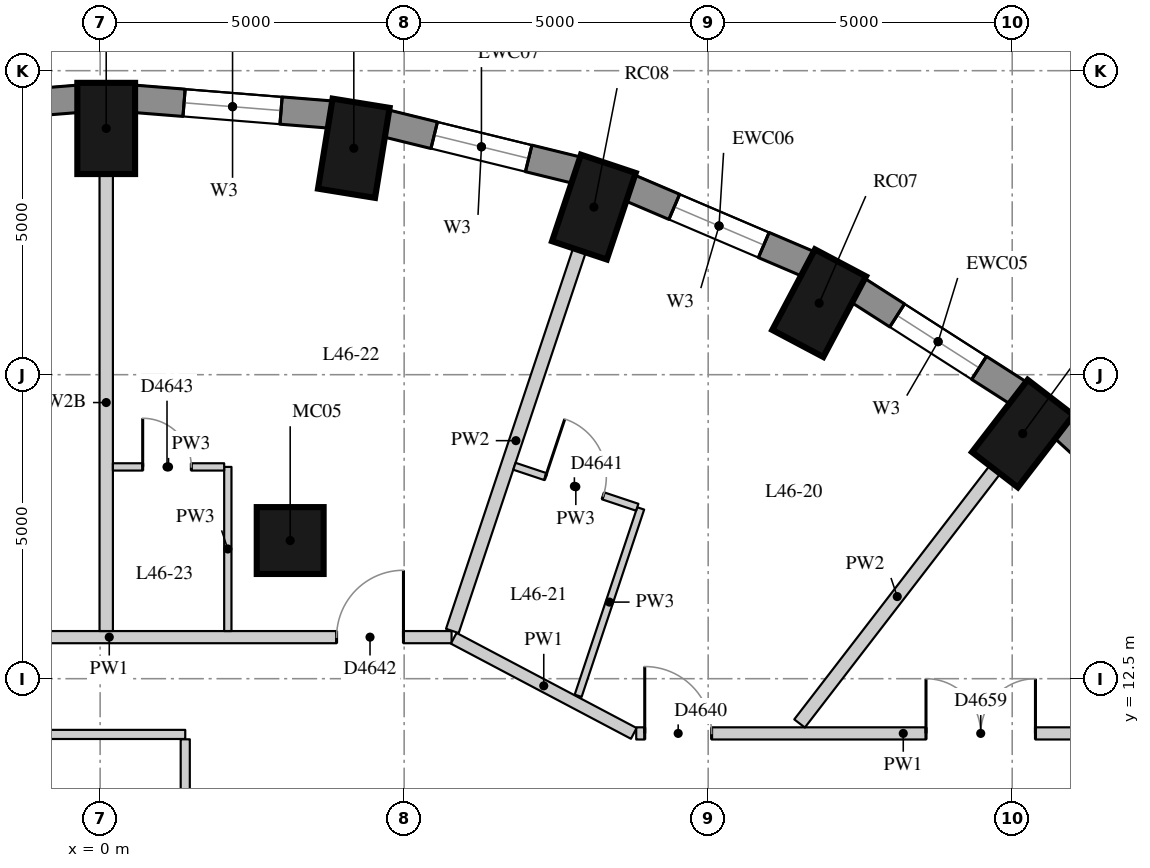
"""IFC4 building model, lengths in metres.
Left out: names, types, materials, properties, quantities, classifications, styles, units other than length and angle.
Written with IfcOpenShell. Run it as: python <this file> out.ifc"""

import sys

from ifc_helpers import new_model, si_unit, direction, frame, frame_2d, origin, origin_2d, place, context, subcontext, project, spatial, rectangle, extrude, element, fill, save


model = new_model("IFC4")
c1 = context("Model", 3, precision=1e-05, world=origin(), true_north=direction((0.0, 1.0)))
c2 = subcontext(c1, "Body", "Model", "MODEL_VIEW")
j1 = project(units=[si_unit("LENGTHUNIT", "METRE"), si_unit("PLANEANGLEUNIT", "RADIAN")], contexts=[c1])
p1 = place(None, origin())
s1 = spatial("IfcSite", under=j1, at=p1, CompositionType="ELEMENT")
p2 = place(p1, origin())
s2 = spatial("IfcBuilding", under=s1, at=p2, CompositionType="ELEMENT")
p3 = place(p2, frame((0.0, 0.0, 164.9)))
s3 = spatial("IfcBuildingStorey", under=s2, at=p3, CompositionType="ELEMENT", Elevation=164.9)
for number, where, z_axis, x_axis in (
    (1, (15.173, 16.532, 0.0), (0.0, 0.0, 1.0), (0.61, 0.792, 0.0)),
    (2, (11.825, 18.676, 0.0), (0.0, 0.0, 1.0), (0.468, 0.884, 0.0)),
    (3, (8.12, 20.256, 0.0), (0.0, 0.0, 1.0), (0.317, 0.949, 0.0)),
    (4, (4.172, 21.224, 0.0), (0.0, 0.0, 1.0), (0.16, 0.987, 0.0)),
    (5, (0.1, 21.55, 0.0), (0.0, 0.0, 1.0), (0.0, 1.0, 0.0)),
):
    element("IfcColumn", number, at=place(p3, frame(where, z_axis=z_axis, x_axis=x_axis)), inside=s3, PredefinedType="COLUMN", context=c2, shape_type="SweptSolid", body=[
        extrude(rectangle(XDim=1.5, YDim=0.95, at=origin_2d()), origin(), (0.0, 0.0, 1.0), 3.3),
    ])
p4 = place(p3, frame((3.126, 14.772, 0.0), z_axis=(0.0, 0.0, 1.0), x_axis=(1.0, 0.0, 0.0)))
e6 = element("IfcColumn", 6, at=p4, inside=s3, PredefinedType="COLUMN", context=c2, shape_type="SweptSolid", body=[
    extrude(rectangle(XDim=1.1, YDim=1.1, at=origin_2d()), origin(), (0.0, 0.0, 1.0), 3.3),
])
p5 = place(p3, frame((18.113, 14.55, 0.0), z_axis=(0.0, 0.0, 1.0), x_axis=(-0.737808755941, 0.675009807082, 0.0)))
e7 = element("IfcWall", 7, at=p5, inside=s3, PredefinedType="SOLIDWALL", context=c2, shape_type="SweptSolid", body=[
    extrude(rectangle(XDim=3.094, YDim=0.45, at=frame_2d((1.547, 0.0))), origin(), (0.0, 0.0, 1.0), 3.02),
])
p6 = place(p3, frame((15.108, 17.193, 0.0), z_axis=(0.0, 0.0, 1.0), x_axis=(-0.842030726237, 0.539429565442, 0.0)))
e8 = element("IfcWall", 8, at=p6, inside=s3, PredefinedType="SOLIDWALL", context=c2, shape_type="SweptSolid", body=[
    extrude(rectangle(XDim=3.151, YDim=0.45, at=frame_2d((1.576, 0.0))), origin(), (0.0, 0.0, 1.0), 3.02),
])
p7 = place(p6, frame((0.776, 0.0, 0.4)))
e9 = element("IfcOpeningElement", 9, at=p7, cuts=e8, PredefinedType="OPENING", context=c2, shape_type="SweptSolid", body=[
    extrude(rectangle(XDim=1.6, YDim=1.75, at=frame_2d((0.8, 0.875))), frame((0.0, 0.235, 0.0), z_axis=(0.0, -1.0, 0.0), x_axis=(1.0, 0.0, 0.0)), (0.0, 0.0, 1.0), 0.47),
])
p8 = place(p3, frame((11.65, 19.319, 0.0), z_axis=(0.0, 0.0, 1.0), x_axis=(-0.91981046949, 0.392362969986, 0.0)))
e10 = element("IfcWall", 10, at=p8, inside=s3, PredefinedType="SOLIDWALL", context=c2, shape_type="SweptSolid", body=[
    extrude(rectangle(XDim=3.201, YDim=0.45, at=frame_2d((1.6, 0.0))), origin(), (0.0, 0.0, 1.0), 3.02),
])
p9 = place(p8, frame((0.8, 0.0, 0.4)))
e11 = element("IfcOpeningElement", 11, at=p9, cuts=e10, PredefinedType="OPENING", context=c2, shape_type="SweptSolid", body=[
    extrude(rectangle(XDim=1.6, YDim=1.75, at=frame_2d((0.8, 0.875))), frame((0.0, 0.235, 0.0), z_axis=(0.0, -1.0, 0.0), x_axis=(1.0, 0.0, 0.0)), (0.0, 0.0, 1.0), 0.47),
])
p10 = place(p3, frame((7.843, 20.862, 0.0), z_axis=(0.0, 0.0, 1.0), x_axis=(-0.971237178372, 0.238114139328, 0.0)))
e12 = element("IfcWall", 12, at=p10, inside=s3, PredefinedType="SOLIDWALL", context=c2, shape_type="SweptSolid", body=[
    extrude(rectangle(XDim=3.237, YDim=0.45, at=frame_2d((1.618, 0.0))), origin(), (0.0, 0.0, 1.0), 3.02),
])
p11 = place(p10, frame((0.818, 0.0, 0.4)))
e13 = element("IfcOpeningElement", 13, at=p11, cuts=e12, PredefinedType="OPENING", context=c2, shape_type="SweptSolid", body=[
    extrude(rectangle(XDim=1.6, YDim=1.75, at=frame_2d((0.8, 0.875))), frame((0.0, 0.235, 0.0), z_axis=(0.0, -1.0, 0.0), x_axis=(1.0, 0.0, 0.0)), (0.0, 0.0, 1.0), 0.47),
])
p12 = place(p3, frame((3.801, 21.778, 0.0), z_axis=(0.0, 0.0, 1.0), x_axis=(-0.996812416891, 0.079780984773, 0.0)))
e14 = element("IfcWall", 14, at=p12, inside=s3, PredefinedType="SOLIDWALL", context=c2, shape_type="SweptSolid", body=[
    extrude(rectangle(XDim=3.256, YDim=0.45, at=frame_2d((1.628, 0.0))), origin(), (0.0, 0.0, 1.0), 3.02),
])
p13 = place(p12, frame((0.828, 0.0, 0.4)))
e15 = element("IfcOpeningElement", 15, at=p13, cuts=e14, PredefinedType="OPENING", context=c2, shape_type="SweptSolid", body=[
    extrude(rectangle(XDim=1.6, YDim=1.75, at=frame_2d((0.8, 0.875))), frame((0.0, 0.235, 0.0), z_axis=(0.0, -1.0, 0.0), x_axis=(1.0, 0.0, 0.0)), (0.0, 0.0, 1.0), 0.47),
])
p14 = place(p3, frame((-0.355, 22.038, 0.0), z_axis=(0.0, 0.0, 1.0), x_axis=(-0.996812416891, -0.079780984773, 0.0)))
e16 = element("IfcWall", 16, at=p14, inside=s3, PredefinedType="SOLIDWALL", context=c2, shape_type="SweptSolid", body=[
    extrude(rectangle(XDim=3.256, YDim=0.45, at=frame_2d((1.628, 0.0))), origin(), (0.0, 0.0, 1.0), 3.02),
])
p15 = place(p14, frame((0.828, 0.0, 0.4)))
e17 = element("IfcOpeningElement", 17, at=p15, cuts=e16, PredefinedType="OPENING", context=c2, shape_type="SweptSolid", body=[
    extrude(rectangle(XDim=1.6, YDim=1.75, at=frame_2d((0.8, 0.875))), frame((0.0, 0.235, 0.0), z_axis=(0.0, -1.0, 0.0), x_axis=(1.0, 0.0, 0.0)), (0.0, 0.0, 1.0), 0.47),
])
p16 = place(p3, frame((-5.48, 13.183, 0.0), z_axis=(0.0, 0.0, 1.0), x_axis=(1.0, 0.0, 0.0)))
e18 = element("IfcWall", 18, at=p16, inside=s3, PredefinedType="PARTITIONING", context=c2, shape_type="SweptSolid", body=[
    extrude(rectangle(XDim=11.26, YDim=0.2, at=frame_2d((5.63, 0.0))), origin(), (0.0, 0.0, 1.0), 3.02),
])
p17 = place(p16, frame((9.368, 0.0, 0.0)))
e19 = element("IfcOpeningElement", 19, at=p17, cuts=e18, PredefinedType="OPENING", context=c2, shape_type="SweptSolid", body=[
    extrude(rectangle(XDim=1.1, YDim=2.1, at=frame_2d((0.55, 1.05))), frame((0.0, 0.11, 0.0), z_axis=(0.0, -1.0, 0.0), x_axis=(1.0, 0.0, 0.0)), (0.0, 0.0, 1.0), 0.22),
])
p18 = place(p16, frame((3.115, 0.0, 0.0)))
e20 = element("IfcOpeningElement", 20, at=p18, cuts=e18, PredefinedType="OPENING", context=c2, shape_type="SweptSolid", body=[
    extrude(rectangle(XDim=1.1, YDim=2.1, at=frame_2d((0.55, 1.05))), frame((0.0, 0.11, 0.0), z_axis=(0.0, -1.0, 0.0), x_axis=(1.0, 0.0, 0.0)), (0.0, 0.0, 1.0), 0.22),
])
p19 = place(p3, frame((5.815, 13.165, 0.0), z_axis=(0.0, 0.0, 1.0), x_axis=(0.884172365794, -0.46716081553, 0.0)))
e21 = element("IfcWall", 21, at=p19, inside=s3, PredefinedType="PARTITIONING", context=c2, shape_type="SweptSolid", body=[
    extrude(rectangle(XDim=3.349, YDim=0.2, at=frame_2d((1.675, 0.0))), origin(), (0.0, 0.0, 1.0), 3.02),
])
p20 = place(p3, frame((8.817, 11.6, 0.0), z_axis=(0.0, 0.0, 1.0), x_axis=(1.0, 0.0, 0.0)))
e22 = element("IfcWall", 22, at=p20, inside=s3, PredefinedType="PARTITIONING", context=c2, shape_type="SweptSolid", body=[
    extrude(rectangle(XDim=8.783, YDim=0.2, at=frame_2d((4.392, 0.0))), origin(), (0.0, 0.0, 1.0), 3.02),
])
p21 = place(p20, frame((0.14, 0.0, 0.0)))
e23 = element("IfcOpeningElement", 23, at=p21, cuts=e22, PredefinedType="OPENING", context=c2, shape_type="SweptSolid", body=[
    extrude(rectangle(XDim=1.1, YDim=2.1, at=frame_2d((0.55, 1.05))), frame((0.0, 0.11, 0.0), z_axis=(0.0, -1.0, 0.0), x_axis=(1.0, 0.0, 0.0)), (0.0, 0.0, 1.0), 0.22),
])
p22 = place(p20, frame((4.766, 0.0, 0.0)))
e24 = element("IfcOpeningElement", 24, at=p22, cuts=e22, PredefinedType="OPENING", context=c2, shape_type="SweptSolid", body=[
    extrude(rectangle(XDim=1.8, YDim=2.1, at=frame_2d((0.9, 1.05))), frame((0.0, 0.11, 0.0), z_axis=(0.0, -1.0, 0.0), x_axis=(1.0, 0.0, 0.0)), (0.0, 0.0, 1.0), 0.22),
])
p23 = place(p3, frame((-4.42, 11.583, 0.0), z_axis=(0.0, 0.0, 1.0), x_axis=(1.0, 0.0, 0.0)))
e25 = element("IfcWall", 25, at=p23, inside=s3, PredefinedType="PARTITIONING", context=c2, shape_type="SweptSolid", body=[
    extrude(rectangle(XDim=5.82, YDim=0.15, at=frame_2d((2.91, 0.0))), origin(), (0.0, 0.0, 1.0), 3.02),
])
p24 = place(p3, frame((1.4, 11.503, 0.0), z_axis=(0.0, 0.0, 1.0), x_axis=(0.0, -1.0, 0.0)))
e26 = element("IfcWall", 26, at=p24, inside=s3, PredefinedType="PARTITIONING", context=c2, shape_type="SweptSolid", body=[
    extrude(rectangle(XDim=2.353, YDim=0.15, at=frame_2d((1.177, 0.0))), origin(), (0.0, 0.0, 1.0), 3.02),
])
p25 = place(p3, frame((14.716, 15.937, 0.0), z_axis=(0.0, 0.0, 1.0), x_axis=(-0.61000193202, -0.792399926131, 0.0)))
e27 = element("IfcWall", 27, at=p25, inside=s3, PredefinedType="PARTITIONING", context=c2, shape_type="SweptSolid", body=[
    extrude(rectangle(XDim=5.267, YDim=0.22, at=frame_2d((2.634, 0.0))), origin(), (0.0, 0.0, 1.0), 3.02),
])
p26 = place(p3, frame((7.883, 19.545, 0.0), z_axis=(0.0, 0.0, 1.0), x_axis=(-0.316704947573, -0.948524104166, 0.0)))
e28 = element("IfcWall", 28, at=p26, inside=s3, PredefinedType="PARTITIONING", context=c2, shape_type="SweptSolid", body=[
    extrude(rectangle(XDim=6.599, YDim=0.22, at=frame_2d((3.3, 0.0))), origin(), (0.0, 0.0, 1.0), 3.02),
])
p27 = place(p3, frame((0.1, 20.8, 0.0), z_axis=(0.0, 0.0, 1.0), x_axis=(0.0, -1.0, 0.0)))
e29 = element("IfcWall", 29, at=p27, inside=s3, PredefinedType="PARTITIONING", context=c2, shape_type="SweptSolid", body=[
    extrude(rectangle(XDim=7.517, YDim=0.22, at=frame_2d((3.758, 0.0))), origin(), (0.0, 0.0, 1.0), 2.57),
])
p28 = place(p3, frame((7.862, 12.219, 0.0), z_axis=(0.0, 0.0, 1.0), x_axis=(0.316678625352, 0.948532892548, 0.0)))
e30 = element("IfcWall", 30, at=p28, inside=s3, PredefinedType="PARTITIONING", context=c2, shape_type="SweptSolid", body=[
    extrude(rectangle(XDim=3.249, YDim=0.12, at=frame_2d((1.625, 0.0))), origin(), (0.0, 0.0, 1.0), 3.02),
])
p29 = place(p3, frame((2.1, 13.283, 0.0), z_axis=(0.0, 0.0, 1.0), x_axis=(0.0, 1.0, 0.0)))
e31 = element("IfcWall", 31, at=p29, inside=s3, PredefinedType="PARTITIONING", context=c2, shape_type="SweptSolid", body=[
    extrude(rectangle(XDim=2.7, YDim=0.12, at=frame_2d((1.35, 0.0))), origin(), (0.0, 0.0, 1.0), 3.02),
])
p30 = place(p3, frame((8.833, 15.32, 0.0), z_axis=(0.0, 0.0, 1.0), x_axis=(-0.948557130447, 0.316606017438, 0.0)))
e32 = element("IfcWall", 32, at=p30, inside=s3, PredefinedType="PARTITIONING", context=c2, shape_type="SweptSolid", body=[
    extrude(rectangle(XDim=2.13, YDim=0.12, at=frame_2d((1.065, 0.0))), origin(), (0.0, 0.0, 1.0), 3.02),
])
p31 = place(p30, frame((0.59, 0.0, 0.0)))
e33 = element("IfcOpeningElement", 33, at=p31, cuts=e32, PredefinedType="OPENING", context=c2, shape_type="SweptSolid", body=[
    extrude(rectangle(XDim=1.0, YDim=2.1, at=frame_2d((0.5, 1.05))), frame((0.0, 0.07, 0.0), z_axis=(0.0, -1.0, 0.0), x_axis=(1.0, 0.0, 0.0)), (0.0, 0.0, 1.0), 0.14),
])
p32 = place(p3, frame((2.04, 15.983, 0.0), z_axis=(0.0, 0.0, 1.0), x_axis=(-1.0, 0.0, 0.0)))
e34 = element("IfcWall", 34, at=p32, inside=s3, PredefinedType="PARTITIONING", context=c2, shape_type="SweptSolid", body=[
    extrude(rectangle(XDim=1.83, YDim=0.12, at=frame_2d((0.915, 0.0))), origin(), (0.0, 0.0, 1.0), 3.02),
])
p33 = place(p32, frame((0.54, 0.0, 0.0)))
e35 = element("IfcOpeningElement", 35, at=p33, cuts=e34, PredefinedType="OPENING", context=c2, shape_type="SweptSolid", body=[
    extrude(rectangle(XDim=0.8, YDim=2.1, at=frame_2d((0.4, 1.05))), frame((0.0, 0.07, 0.0), z_axis=(0.0, -1.0, 0.0), x_axis=(1.0, 0.0, 0.0)), (0.0, 0.0, 1.0), 0.14),
])
p34 = place(p7, origin())
e36 = element("IfcWindow", 36, at=p34, inside=s3, PartitioningType="SINGLE_PANEL", PredefinedType="WINDOW", context=c2, shape_type="SweptSolid", body=[
    extrude(rectangle(XDim=1.6, YDim=1.75, at=frame_2d((0.8, 0.875))), frame((0.0, 0.035, 0.0), z_axis=(0.0, -1.0, 0.0), x_axis=(1.0, 0.0, 0.0)), (0.0, 0.0, 1.0), 0.06),
])
fill(e9, e36)
p35 = place(p9, origin())
e37 = element("IfcWindow", 37, at=p35, inside=s3, PartitioningType="SINGLE_PANEL", PredefinedType="WINDOW", context=c2, shape_type="SweptSolid", body=[
    extrude(rectangle(XDim=1.6, YDim=1.75, at=frame_2d((0.8, 0.875))), frame((0.0, 0.035, 0.0), z_axis=(0.0, -1.0, 0.0), x_axis=(1.0, 0.0, 0.0)), (0.0, 0.0, 1.0), 0.06),
])
fill(e11, e37)
p36 = place(p11, origin())
e38 = element("IfcWindow", 38, at=p36, inside=s3, PartitioningType="SINGLE_PANEL", PredefinedType="WINDOW", context=c2, shape_type="SweptSolid", body=[
    extrude(rectangle(XDim=1.6, YDim=1.75, at=frame_2d((0.8, 0.875))), frame((0.0, 0.035, 0.0), z_axis=(0.0, -1.0, 0.0), x_axis=(1.0, 0.0, 0.0)), (0.0, 0.0, 1.0), 0.06),
])
fill(e13, e38)
p37 = place(p13, origin())
e39 = element("IfcWindow", 39, at=p37, inside=s3, PartitioningType="SINGLE_PANEL", PredefinedType="WINDOW", context=c2, shape_type="SweptSolid", body=[
    extrude(rectangle(XDim=1.6, YDim=1.75, at=frame_2d((0.8, 0.875))), frame((0.0, 0.035, 0.0), z_axis=(0.0, -1.0, 0.0), x_axis=(1.0, 0.0, 0.0)), (0.0, 0.0, 1.0), 0.06),
])
fill(e15, e39)
p38 = place(p21, origin())
e40 = element("IfcDoor", 40, at=p38, inside=s3, OperationType="SINGLE_SWING_LEFT", PredefinedType="DOOR", context=c2, shape_type="SweptSolid", body=[
    extrude(rectangle(XDim=1.1, YDim=2.1, at=frame_2d((0.55, 1.05))), frame((0.0, 0.025, 0.0), z_axis=(0.0, -1.0, 0.0), x_axis=(1.0, 0.0, 0.0)), (0.0, 0.0, 1.0), 0.05),
])
fill(e23, e40)
p39 = place(p31, origin())
e41 = element("IfcDoor", 41, at=p39, inside=s3, OperationType="SINGLE_SWING_LEFT", PredefinedType="DOOR", context=c2, shape_type="SweptSolid", body=[
    extrude(rectangle(XDim=1.0, YDim=2.1, at=frame_2d((0.5, 1.05))), frame((0.0, 0.025, 0.0), z_axis=(0.0, -1.0, 0.0), x_axis=(1.0, 0.0, 0.0)), (0.0, 0.0, 1.0), 0.05),
])
fill(e33, e41)
p40 = place(p17, origin())
e42 = element("IfcDoor", 42, at=p40, inside=s3, OperationType="SINGLE_SWING_RIGHT", PredefinedType="DOOR", context=c2, shape_type="SweptSolid", body=[
    extrude(rectangle(XDim=1.1, YDim=2.1, at=frame_2d((0.55, 1.05))), frame((0.0, 0.025, 0.0), z_axis=(0.0, -1.0, 0.0), x_axis=(1.0, 0.0, 0.0)), (0.0, 0.0, 1.0), 0.05),
])
fill(e19, e42)
p41 = place(p33, origin())
e43 = element("IfcDoor", 43, at=p41, inside=s3, OperationType="SINGLE_SWING_LEFT", PredefinedType="DOOR", context=c2, shape_type="SweptSolid", body=[
    extrude(rectangle(XDim=0.8, YDim=2.1, at=frame_2d((0.4, 1.05))), frame((0.0, 0.025, 0.0), z_axis=(0.0, -1.0, 0.0), x_axis=(1.0, 0.0, 0.0)), (0.0, 0.0, 1.0), 0.05),
])
fill(e35, e43)
p42 = place(p22, origin())
e44 = element("IfcDoor", 44, at=p42, inside=s3, OperationType="DOUBLE_DOOR_SINGLE_SWING", PredefinedType="DOOR", context=c2, shape_type="SweptSolid", body=[
    extrude(rectangle(XDim=1.8, YDim=2.1, at=frame_2d((0.9, 1.05))), frame((0.0, 0.025, 0.0), z_axis=(0.0, -1.0, 0.0), x_axis=(1.0, 0.0, 0.0)), (0.0, 0.0, 1.0), 0.05),
])
fill(e24, e44)
save(model, sys.argv[1])
